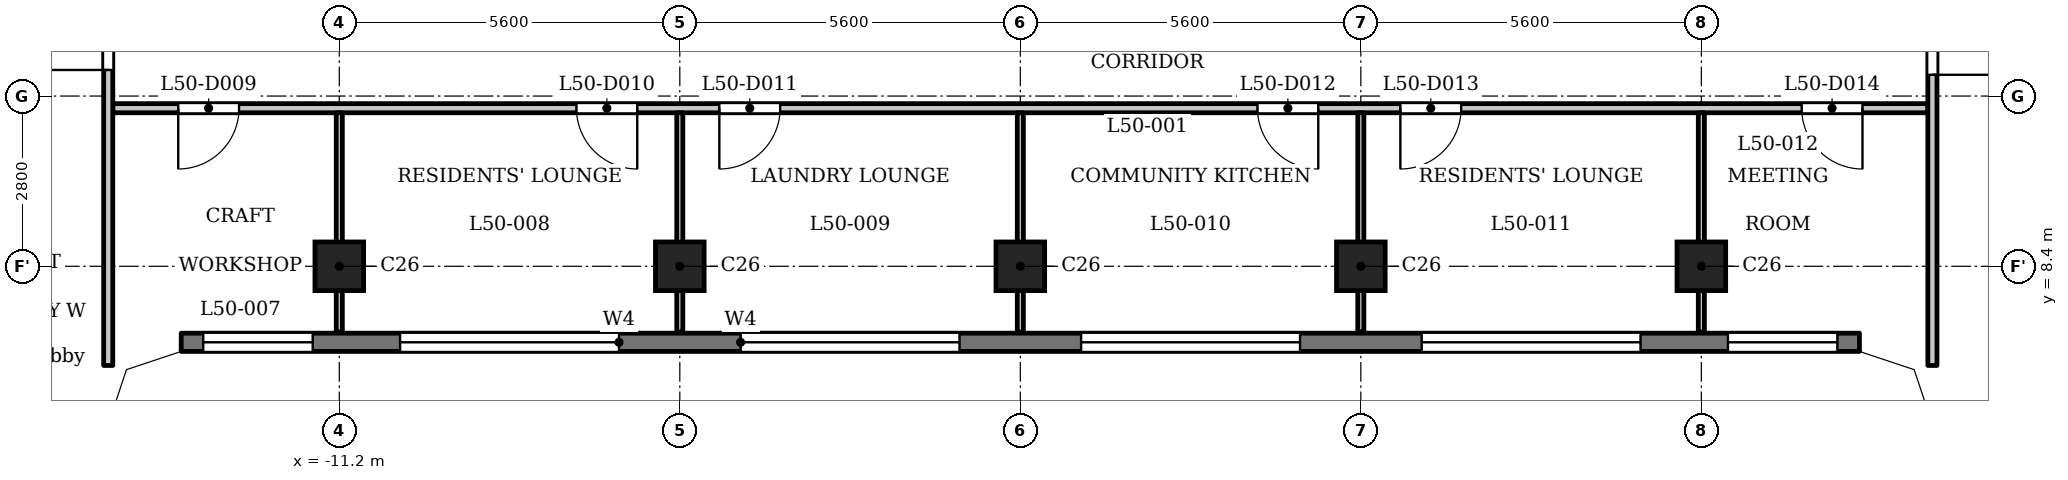
"""IFC4 building model, lengths in metres.
Left out: names, types, materials, properties, quantities, classifications, styles, units other than length and angle.
Written with IfcOpenShell. Run it as: python <this file> out.ifc"""

import sys

from ifc_helpers import new_model, si_unit, direction, frame, frame_2d, origin, origin_2d, place, context, subcontext, project, spatial, polyline, rectangle, outline, extrude, element, fill, save


model = new_model("IFC4")
c1 = context("Model", 3, precision=1e-05, world=origin(), true_north=direction((0.0, 1.0)))
c2 = subcontext(c1, "Body", "Model", "MODEL_VIEW")
j1 = project(units=[si_unit("LENGTHUNIT", "METRE"), si_unit("PLANEANGLEUNIT", "RADIAN")], contexts=[c1])
p1 = place(None, origin())
s1 = spatial("IfcSite", under=j1, at=p1, CompositionType="ELEMENT")
p2 = place(p1, origin())
s2 = spatial("IfcBuilding", under=s1, at=p2, CompositionType="ELEMENT")
p3 = place(p2, frame((0.0, 0.0, 195.9)))
s3 = spatial("IfcBuildingStorey", under=s2, at=p3, CompositionType="ELEMENT", Elevation=195.9)
for number, where, z_axis, x_axis in (
    (1, (-11.2, 8.4, 0.0), (0.0, 0.0, 1.0), (1.0, 0.0, 0.0)),
    (2, (-5.6, 8.4, 0.0), (0.0, 0.0, 1.0), (1.0, 0.0, 0.0)),
    (3, (0.0, 8.4, 0.0), (0.0, 0.0, 1.0), (1.0, 0.0, 0.0)),
    (4, (5.6, 8.4, 0.0), (0.0, 0.0, 1.0), (1.0, 0.0, 0.0)),
    (5, (11.2, 8.4, 0.0), (0.0, 0.0, 1.0), (1.0, 0.0, 0.0)),
):
    element("IfcColumn", number, at=place(p3, frame(where, z_axis=z_axis, x_axis=x_axis)), inside=s3, PredefinedType="COLUMN", context=c2, shape_type="SweptSolid", body=[
        extrude(rectangle(XDim=0.8, YDim=0.8, at=origin_2d()), origin(), (0.0, 0.0, 1.0), 3.5),
    ])
p4 = place(p3, frame((-13.8, 7.15, 0.0), z_axis=(0.0, 0.0, 1.0), x_axis=(1.0, 0.0, 0.0)))
e6 = element("IfcWall", 6, at=p4, inside=s3, PredefinedType="SOLIDWALL", context=c2, shape_type="SweptSolid", body=[
    extrude(rectangle(XDim=27.6, YDim=0.3, at=frame_2d((13.8, 0.0))), origin(), (0.0, 0.0, 1.0), 3.2),
])
p5 = place(p4, frame((0.363, 0.0, 0.9)))
e7 = element("IfcOpeningElement", 7, at=p5, cuts=e6, PredefinedType="OPENING", context=c2, shape_type="SweptSolid", body=[
    extrude(rectangle(XDim=1.8, YDim=1.25, at=frame_2d((0.9, 0.625))), frame((0.0, 0.16, 0.0), z_axis=(0.0, -1.0, 0.0), x_axis=(1.0, 0.0, 0.0)), (0.0, 0.0, 1.0), 0.32),
])
p6 = place(p4, frame((3.6, 0.0, 1.2)))
e8 = element("IfcOpeningElement", 8, at=p6, cuts=e6, PredefinedType="OPENING", context=c2, shape_type="SweptSolid", body=[
    extrude(rectangle(XDim=3.6, YDim=0.95, at=frame_2d((1.8, 0.475))), frame((0.0, 0.16, 0.0), z_axis=(0.0, -1.0, 0.0), x_axis=(1.0, 0.0, 0.0)), (0.0, 0.0, 1.0), 0.32),
])
p7 = place(p4, frame((9.2, 0.0, 1.2)))
e9 = element("IfcOpeningElement", 9, at=p7, cuts=e6, PredefinedType="OPENING", context=c2, shape_type="SweptSolid", body=[
    extrude(rectangle(XDim=3.6, YDim=0.95, at=frame_2d((1.8, 0.475))), frame((0.0, 0.16, 0.0), z_axis=(0.0, -1.0, 0.0), x_axis=(1.0, 0.0, 0.0)), (0.0, 0.0, 1.0), 0.32),
])
p8 = place(p4, frame((14.8, 0.0, 1.2)))
e10 = element("IfcOpeningElement", 10, at=p8, cuts=e6, PredefinedType="OPENING", context=c2, shape_type="SweptSolid", body=[
    extrude(rectangle(XDim=3.6, YDim=0.95, at=frame_2d((1.8, 0.475))), frame((0.0, 0.16, 0.0), z_axis=(0.0, -1.0, 0.0), x_axis=(1.0, 0.0, 0.0)), (0.0, 0.0, 1.0), 0.32),
])
p9 = place(p4, frame((20.4, 0.0, 1.2)))
e11 = element("IfcOpeningElement", 11, at=p9, cuts=e6, PredefinedType="OPENING", context=c2, shape_type="SweptSolid", body=[
    extrude(rectangle(XDim=3.6, YDim=0.95, at=frame_2d((1.8, 0.475))), frame((0.0, 0.16, 0.0), z_axis=(0.0, -1.0, 0.0), x_axis=(1.0, 0.0, 0.0)), (0.0, 0.0, 1.0), 0.32),
])
p10 = place(p4, frame((25.438, 0.0, 0.9)))
e12 = element("IfcOpeningElement", 12, at=p10, cuts=e6, PredefinedType="OPENING", context=c2, shape_type="SweptSolid", body=[
    extrude(rectangle(XDim=1.8, YDim=1.25, at=frame_2d((0.9, 0.625))), frame((0.0, 0.16, 0.0), z_axis=(0.0, -1.0, 0.0), x_axis=(1.0, 0.0, 0.0)), (0.0, 0.0, 1.0), 0.32),
])
p11 = place(p3, frame((-14.925, 11.0, 0.0), z_axis=(0.0, 0.0, 1.0), x_axis=(1.0, 0.0, 0.0)))
e13 = element("IfcWall", 13, at=p11, inside=s3, PredefinedType="PARTITIONING", context=c2, shape_type="SweptSolid", body=[
    extrude(rectangle(XDim=29.85, YDim=0.15, at=frame_2d((14.925, 0.0))), origin(), (0.0, 0.0, 1.0), 3.2),
])
p12 = place(p11, frame((1.076, 0.0, 0.0)))
e14 = element("IfcOpeningElement", 14, at=p12, cuts=e13, PredefinedType="OPENING", context=c2, shape_type="SweptSolid", body=[
    extrude(rectangle(XDim=1.0, YDim=2.1, at=frame_2d((0.5, 1.05))), frame((0.0, 0.085, 0.0), z_axis=(0.0, -1.0, 0.0), x_axis=(1.0, 0.0, 0.0)), (0.0, 0.0, 1.0), 0.17),
])
p13 = place(p11, frame((7.625, 0.0, 0.0)))
e15 = element("IfcOpeningElement", 15, at=p13, cuts=e13, PredefinedType="OPENING", context=c2, shape_type="SweptSolid", body=[
    extrude(rectangle(XDim=1.0, YDim=2.1, at=frame_2d((0.5, 1.05))), frame((0.0, 0.085, 0.0), z_axis=(0.0, -1.0, 0.0), x_axis=(1.0, 0.0, 0.0)), (0.0, 0.0, 1.0), 0.17),
])
p14 = place(p11, frame((9.975, 0.0, 0.0)))
e16 = element("IfcOpeningElement", 16, at=p14, cuts=e13, PredefinedType="OPENING", context=c2, shape_type="SweptSolid", body=[
    extrude(rectangle(XDim=1.0, YDim=2.1, at=frame_2d((0.5, 1.05))), frame((0.0, 0.085, 0.0), z_axis=(0.0, -1.0, 0.0), x_axis=(1.0, 0.0, 0.0)), (0.0, 0.0, 1.0), 0.17),
])
p15 = place(p11, frame((18.825, 0.0, 0.0)))
e17 = element("IfcOpeningElement", 17, at=p15, cuts=e13, PredefinedType="OPENING", context=c2, shape_type="SweptSolid", body=[
    extrude(rectangle(XDim=1.0, YDim=2.1, at=frame_2d((0.5, 1.05))), frame((0.0, 0.085, 0.0), z_axis=(0.0, -1.0, 0.0), x_axis=(1.0, 0.0, 0.0)), (0.0, 0.0, 1.0), 0.17),
])
p16 = place(p11, frame((21.175, 0.0, 0.0)))
e18 = element("IfcOpeningElement", 18, at=p16, cuts=e13, PredefinedType="OPENING", context=c2, shape_type="SweptSolid", body=[
    extrude(rectangle(XDim=1.0, YDim=2.1, at=frame_2d((0.5, 1.05))), frame((0.0, 0.085, 0.0), z_axis=(0.0, -1.0, 0.0), x_axis=(1.0, 0.0, 0.0)), (0.0, 0.0, 1.0), 0.17),
])
p17 = place(p11, frame((27.775, 0.0, 0.0)))
e19 = element("IfcOpeningElement", 19, at=p17, cuts=e13, PredefinedType="OPENING", context=c2, shape_type="SweptSolid", body=[
    extrude(rectangle(XDim=1.0, YDim=2.1, at=frame_2d((0.5, 1.05))), frame((0.0, 0.085, 0.0), z_axis=(0.0, -1.0, 0.0), x_axis=(1.0, 0.0, 0.0)), (0.0, 0.0, 1.0), 0.17),
])
p18 = place(p3, frame((-15.0, 6.769, 0.0), z_axis=(0.0, 0.0, 1.0), x_axis=(0.0, 1.0, 0.0)))
e20 = element("IfcWall", 20, at=p18, inside=s3, PredefinedType="PARTITIONING", context=c2, shape_type="SweptSolid", body=[
    extrude(rectangle(XDim=6.356, YDim=0.15, at=frame_2d((3.178, 0.0))), origin(), (0.0, 0.0, 1.0), 3.2),
])
p19 = place(p18, frame((4.86, 0.0, 0.0)))
e21 = element("IfcOpeningElement", 21, at=p19, cuts=e20, PredefinedType="OPENING", context=c2, shape_type="SweptSolid", body=[
    extrude(rectangle(XDim=1.0, YDim=2.1, at=frame_2d((0.5, 1.05))), frame((0.0, 0.085, 0.0), z_axis=(0.0, -1.0, 0.0), x_axis=(1.0, 0.0, 0.0)), (0.0, 0.0, 1.0), 0.17),
])
for number, where, z_axis, x_axis in (
    (22, (-11.2, 7.32, 0.0), (0.0, 0.0, 1.0), (0.0, 1.0, 0.0)),
    (23, (-5.6, 7.32, 0.0), (0.0, 0.0, 1.0), (0.0, 1.0, 0.0)),
    (24, (0.0, 7.32, 0.0), (0.0, 0.0, 1.0), (0.0, 1.0, 0.0)),
    (25, (5.6, 7.32, 0.0), (0.0, 0.0, 1.0), (0.0, 1.0, 0.0)),
    (26, (11.2, 7.32, 0.0), (0.0, 0.0, 1.0), (0.0, 1.0, 0.0)),
):
    element("IfcWall", number, at=place(p3, frame(where, z_axis=z_axis, x_axis=x_axis)), inside=s3, PredefinedType="PARTITIONING", context=c2, shape_type="SweptSolid", body=[
        extrude(rectangle(XDim=3.605, YDim=0.1, at=frame_2d((1.802, 0.0))), origin(), (0.0, 0.0, 1.0), 3.2),
    ])
p20 = place(p3, frame((15.0, 6.769, 0.0), z_axis=(0.0, 0.0, 1.0), x_axis=(0.0, 1.0, 0.0)))
e27 = element("IfcWall", 27, at=p20, inside=s3, PredefinedType="PARTITIONING", context=c2, shape_type="SweptSolid", body=[
    extrude(rectangle(XDim=6.356, YDim=0.15, at=frame_2d((3.178, 0.0))), origin(), (0.0, 0.0, 1.0), 3.2),
])
p21 = place(p20, frame((4.781, 0.0, 0.0)))
e28 = element("IfcOpeningElement", 28, at=p21, cuts=e27, PredefinedType="OPENING", context=c2, shape_type="SweptSolid", body=[
    extrude(rectangle(XDim=1.0, YDim=2.1, at=frame_2d((0.5, 1.05))), frame((0.0, 0.085, 0.0), z_axis=(0.0, -1.0, 0.0), x_axis=(1.0, 0.0, 0.0)), (0.0, 0.0, 1.0), 0.17),
])
p22 = place(p3, origin())
e29 = element("IfcWall", 29, at=p22, inside=s3, PredefinedType="SOLIDWALL", context=c2, shape_type="SweptSolid", body=[
    extrude(outline(polyline([(-13.849, 7.3), (-14.937, 6.937), (-15.3, 5.849), (-15.3, 5.8), (-15.0, 5.8), (-14.7, 6.7), (-13.8, 7.0), (-13.8, 7.3), (-13.849, 7.3)])), origin(), (0.0, 0.0, 1.0), 3.2),
])
e30 = element("IfcWall", 30, at=p22, inside=s3, PredefinedType="SOLIDWALL", context=c2, shape_type="SweptSolid", body=[
    extrude(outline(polyline([(14.937, 6.937), (13.849, 7.3), (13.8, 7.3), (13.8, 7.0), (14.7, 6.7), (15.0, 5.8), (15.3, 5.8), (15.3, 5.849), (14.937, 6.937)])), origin(), (0.0, 0.0, 1.0), 3.2),
])
p23 = place(p19, origin())
e31 = element("IfcDoor", 31, at=p23, inside=s3, OperationType="SINGLE_SWING_RIGHT", PredefinedType="DOOR", context=c2, shape_type="SweptSolid", body=[
    extrude(rectangle(XDim=1.0, YDim=2.1, at=frame_2d((0.5, 1.05))), frame((0.0, 0.025, 0.0), z_axis=(0.0, -1.0, 0.0), x_axis=(1.0, 0.0, 0.0)), (0.0, 0.0, 1.0), 0.05),
])
fill(e21, e31)
p24 = place(p21, origin())
e32 = element("IfcDoor", 32, at=p24, inside=s3, OperationType="SINGLE_SWING_LEFT", PredefinedType="DOOR", context=c2, shape_type="SweptSolid", body=[
    extrude(rectangle(XDim=1.0, YDim=2.1, at=frame_2d((0.5, 1.05))), frame((0.0, 0.025, 0.0), z_axis=(0.0, -1.0, 0.0), x_axis=(1.0, 0.0, 0.0)), (0.0, 0.0, 1.0), 0.05),
])
fill(e28, e32)
p25 = place(p12, origin())
e33 = element("IfcDoor", 33, at=p25, inside=s3, OperationType="SINGLE_SWING_LEFT", PredefinedType="DOOR", context=c2, shape_type="SweptSolid", body=[
    extrude(rectangle(XDim=1.0, YDim=2.1, at=frame_2d((0.5, 1.05))), frame((0.0, 0.025, 0.0), z_axis=(0.0, -1.0, 0.0), x_axis=(1.0, 0.0, 0.0)), (0.0, 0.0, 1.0), 0.05),
])
fill(e14, e33)
p26 = place(p13, origin())
e34 = element("IfcDoor", 34, at=p26, inside=s3, OperationType="SINGLE_SWING_RIGHT", PredefinedType="DOOR", context=c2, shape_type="SweptSolid", body=[
    extrude(rectangle(XDim=1.0, YDim=2.1, at=frame_2d((0.5, 1.05))), frame((0.0, 0.025, 0.0), z_axis=(0.0, -1.0, 0.0), x_axis=(1.0, 0.0, 0.0)), (0.0, 0.0, 1.0), 0.05),
])
fill(e15, e34)
p27 = place(p14, origin())
e35 = element("IfcDoor", 35, at=p27, inside=s3, OperationType="SINGLE_SWING_LEFT", PredefinedType="DOOR", context=c2, shape_type="SweptSolid", body=[
    extrude(rectangle(XDim=1.0, YDim=2.1, at=frame_2d((0.5, 1.05))), frame((0.0, 0.025, 0.0), z_axis=(0.0, -1.0, 0.0), x_axis=(1.0, 0.0, 0.0)), (0.0, 0.0, 1.0), 0.05),
])
fill(e16, e35)
p28 = place(p15, origin())
e36 = element("IfcDoor", 36, at=p28, inside=s3, OperationType="SINGLE_SWING_RIGHT", PredefinedType="DOOR", context=c2, shape_type="SweptSolid", body=[
    extrude(rectangle(XDim=1.0, YDim=2.1, at=frame_2d((0.5, 1.05))), frame((0.0, 0.025, 0.0), z_axis=(0.0, -1.0, 0.0), x_axis=(1.0, 0.0, 0.0)), (0.0, 0.0, 1.0), 0.05),
])
fill(e17, e36)
p29 = place(p16, origin())
e37 = element("IfcDoor", 37, at=p29, inside=s3, OperationType="SINGLE_SWING_LEFT", PredefinedType="DOOR", context=c2, shape_type="SweptSolid", body=[
    extrude(rectangle(XDim=1.0, YDim=2.1, at=frame_2d((0.5, 1.05))), frame((0.0, 0.025, 0.0), z_axis=(0.0, -1.0, 0.0), x_axis=(1.0, 0.0, 0.0)), (0.0, 0.0, 1.0), 0.05),
])
fill(e18, e37)
p30 = place(p17, origin())
e38 = element("IfcDoor", 38, at=p30, inside=s3, OperationType="SINGLE_SWING_RIGHT", PredefinedType="DOOR", context=c2, shape_type="SweptSolid", body=[
    extrude(rectangle(XDim=1.0, YDim=2.1, at=frame_2d((0.5, 1.05))), frame((0.0, 0.025, 0.0), z_axis=(0.0, -1.0, 0.0), x_axis=(1.0, 0.0, 0.0)), (0.0, 0.0, 1.0), 0.05),
])
fill(e19, e38)
p31 = place(p5, origin())
e39 = element("IfcWindow", 39, at=p31, inside=s3, PartitioningType="SINGLE_PANEL", PredefinedType="WINDOW", context=c2, shape_type="SweptSolid", body=[
    extrude(rectangle(XDim=1.8, YDim=1.25, at=frame_2d((0.9, 0.625))), frame((0.0, 0.03, 0.0), z_axis=(0.0, -1.0, 0.0), x_axis=(1.0, 0.0, 0.0)), (0.0, 0.0, 1.0), 0.06),
])
fill(e7, e39)
p32 = place(p6, origin())
e40 = element("IfcWindow", 40, at=p32, inside=s3, PartitioningType="SINGLE_PANEL", PredefinedType="WINDOW", context=c2, shape_type="SweptSolid", body=[
    extrude(rectangle(XDim=3.6, YDim=0.95, at=frame_2d((1.8, 0.475))), frame((0.0, 0.03, 0.0), z_axis=(0.0, -1.0, 0.0), x_axis=(1.0, 0.0, 0.0)), (0.0, 0.0, 1.0), 0.06),
])
fill(e8, e40)
p33 = place(p7, origin())
e41 = element("IfcWindow", 41, at=p33, inside=s3, PartitioningType="SINGLE_PANEL", PredefinedType="WINDOW", context=c2, shape_type="SweptSolid", body=[
    extrude(rectangle(XDim=3.6, YDim=0.95, at=frame_2d((1.8, 0.475))), frame((0.0, 0.03, 0.0), z_axis=(0.0, -1.0, 0.0), x_axis=(1.0, 0.0, 0.0)), (0.0, 0.0, 1.0), 0.06),
])
fill(e9, e41)
p34 = place(p8, origin())
e42 = element("IfcWindow", 42, at=p34, inside=s3, PartitioningType="SINGLE_PANEL", PredefinedType="WINDOW", context=c2, shape_type="SweptSolid", body=[
    extrude(rectangle(XDim=3.6, YDim=0.95, at=frame_2d((1.8, 0.475))), frame((0.0, 0.03, 0.0), z_axis=(0.0, -1.0, 0.0), x_axis=(1.0, 0.0, 0.0)), (0.0, 0.0, 1.0), 0.06),
])
fill(e10, e42)
p35 = place(p9, origin())
e43 = element("IfcWindow", 43, at=p35, inside=s3, PartitioningType="SINGLE_PANEL", PredefinedType="WINDOW", context=c2, shape_type="SweptSolid", body=[
    extrude(rectangle(XDim=3.6, YDim=0.95, at=frame_2d((1.8, 0.475))), frame((0.0, 0.03, 0.0), z_axis=(0.0, -1.0, 0.0), x_axis=(1.0, 0.0, 0.0)), (0.0, 0.0, 1.0), 0.06),
])
fill(e11, e43)
p36 = place(p10, origin())
e44 = element("IfcWindow", 44, at=p36, inside=s3, PartitioningType="SINGLE_PANEL", PredefinedType="WINDOW", context=c2, shape_type="SweptSolid", body=[
    extrude(rectangle(XDim=1.8, YDim=1.25, at=frame_2d((0.9, 0.625))), frame((0.0, 0.03, 0.0), z_axis=(0.0, -1.0, 0.0), x_axis=(1.0, 0.0, 0.0)), (0.0, 0.0, 1.0), 0.06),
])
fill(e12, e44)
save(model, sys.argv[1])
